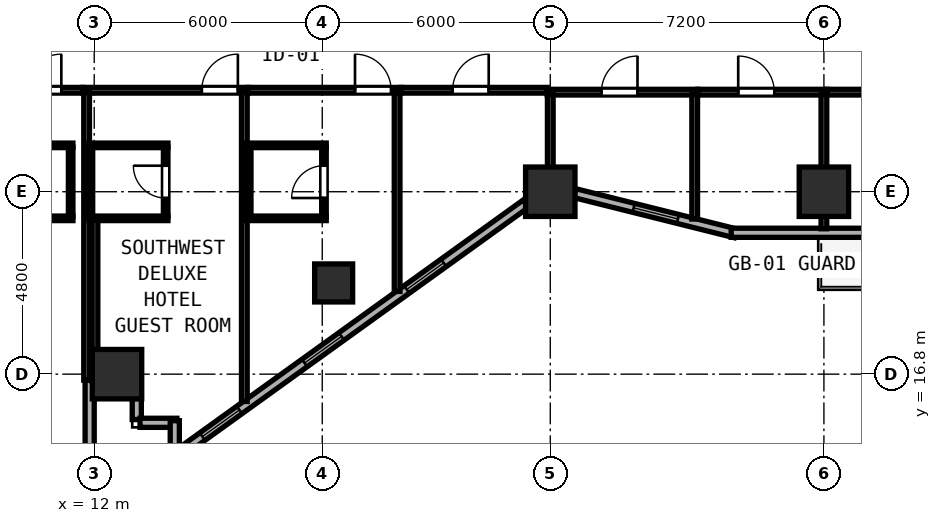
"""IFC4 building model, lengths in metres.
Left out: names, types, materials, properties, quantities, classifications, styles, units other than length and angle.
Written with IfcOpenShell. Run it as: python <this file> out.ifc"""

import sys

from ifc_helpers import new_model, si_unit, direction, frame, frame_2d, origin, origin_2d, place, context, subcontext, project, spatial, rectangle, hollow_rectangle, extrude, element, fill, save


model = new_model("IFC4")
c1 = context("Model", 3, precision=1e-05, world=origin(), true_north=direction((0.0, 1.0)))
c2 = subcontext(c1, "Body", "Model", "MODEL_VIEW")
j1 = project(units=[si_unit("LENGTHUNIT", "METRE"), si_unit("PLANEANGLEUNIT", "RADIAN")], contexts=[c1])
p1 = place(None, origin())
s1 = spatial("IfcSite", under=j1, at=p1, CompositionType="ELEMENT")
p2 = place(p1, origin())
s2 = spatial("IfcBuilding", under=s1, at=p2, CompositionType="ELEMENT")
p3 = place(p2, frame((0.0, 0.0, 39.2)))
s3 = spatial("IfcBuildingStorey", under=s2, at=p3, CompositionType="ELEMENT", Elevation=39.2)
for number, where, z_axis, x_axis in (
    (1, (24.0, 21.6, 0.0), (0.0, 0.0, 1.0), (1.0, 0.0, 0.0)),
    (2, (31.2, 21.6, 0.0), (0.0, 0.0, 1.0), (1.0, 0.0, 0.0)),
    (3, (12.6, 16.8, 0.0), (0.0, 0.0, 1.0), (1.0, 0.0, 0.0)),
):
    element("IfcColumn", number, at=place(p3, frame(where, z_axis=z_axis, x_axis=x_axis)), inside=s3, PredefinedType="COLUMN", context=c2, shape_type="SweptSolid", body=[
        extrude(hollow_rectangle(XDim=1.3, YDim=1.3, WallThickness=0.048, at=origin_2d()), origin(), (0.0, 0.0, 1.0), 3.8),
    ])
p4 = place(p3, frame((18.3, 19.2, 0.0), z_axis=(0.0, 0.0, 1.0), x_axis=(1.0, 0.0, 0.0)))
e4 = element("IfcColumn", 4, at=p4, inside=s3, PredefinedType="COLUMN", context=c2, shape_type="SweptSolid", body=[
    extrude(hollow_rectangle(XDim=1.0, YDim=1.0, WallThickness=0.038, at=origin_2d()), origin(), (0.0, 0.0, 1.0), 3.8),
])
p5 = place(p3, frame((11.88, 14.394, 0.0), z_axis=(0.0, 0.0, 1.0), x_axis=(0.0, 1.0, 0.0)))
e5 = element("IfcWall", 5, at=p5, inside=s3, PredefinedType="SOLIDWALL", context=c2, shape_type="SweptSolid", body=[
    extrude(rectangle(XDim=2.246, YDim=0.24, at=frame_2d((1.123, 0.0))), origin(), (0.0, 0.0, 1.0), 3.54),
])
p6 = place(p3, frame((13.12, 16.158, 0.0), z_axis=(0.0, 0.0, 1.0), x_axis=(0.0, -1.0, 0.0)))
e6 = element("IfcWall", 6, at=p6, inside=s3, PredefinedType="SOLIDWALL", context=c2, shape_type="SweptSolid", body=[
    extrude(rectangle(XDim=0.553, YDim=0.24, at=frame_2d((0.276, 0.0))), origin(), (0.0, 0.0, 1.0), 3.54),
])
p7 = place(p3, frame((13.205, 15.52, 0.0), z_axis=(0.0, 0.0, 1.0), x_axis=(1.0, 0.0, 0.0)))
e7 = element("IfcWall", 7, at=p7, inside=s3, PredefinedType="SOLIDWALL", context=c2, shape_type="SweptSolid", body=[
    extrude(rectangle(XDim=0.97, YDim=0.24, at=frame_2d((0.485, 0.0))), origin(), (0.0, 0.0, 1.0), 3.54),
])
p8 = place(p3, frame((14.12, 15.575, 0.0), z_axis=(0.0, 0.0, 1.0), x_axis=(0.0, -1.0, 0.0)))
e8 = element("IfcWall", 8, at=p8, inside=s3, PredefinedType="SOLIDWALL", context=c2, shape_type="SweptSolid", body=[
    extrude(rectangle(XDim=0.996, YDim=0.24, at=frame_2d((0.498, 0.0))), origin(), (0.0, 0.0, 1.0), 3.54),
])
p9 = place(p3, frame((14.075, 14.602, 0.0), z_axis=(0.0, 0.0, 1.0), x_axis=(0.811535555989, 0.584303038984, 0.0)))
e9 = element("IfcWall", 9, at=p9, inside=s3, PredefinedType="SOLIDWALL", context=c2, shape_type="SweptSolid", body=[
    extrude(rectangle(XDim=11.438, YDim=0.24, at=frame_2d((5.719, 0.0))), origin(), (0.0, 0.0, 1.0), 3.037),
])
p10 = place(p9, frame((0.95, 0.0, 0.85)))
e10 = element("IfcOpeningElement", 10, at=p10, cuts=e9, PredefinedType="OPENING", context=c2, shape_type="SweptSolid", body=[
    extrude(rectangle(XDim=1.2, YDim=1.85, at=frame_2d((0.6, 0.925))), frame((0.0, 0.13, 0.0), z_axis=(0.0, -1.0, 0.0), x_axis=(1.0, 0.0, 0.0)), (0.0, 0.0, 1.0), 0.26),
])
p11 = place(p9, frame((7.574, 0.0, 0.85)))
e11 = element("IfcOpeningElement", 11, at=p11, cuts=e9, PredefinedType="OPENING", context=c2, shape_type="SweptSolid", body=[
    extrude(rectangle(XDim=1.2, YDim=1.85, at=frame_2d((0.6, 0.925))), frame((0.0, 0.13, 0.0), z_axis=(0.0, -1.0, 0.0), x_axis=(1.0, 0.0, 0.0)), (0.0, 0.0, 1.0), 0.26),
])
p12 = place(p9, frame((4.262, 0.0, 0.85)))
e12 = element("IfcOpeningElement", 12, at=p12, cuts=e9, PredefinedType="OPENING", context=c2, shape_type="SweptSolid", body=[
    extrude(rectangle(XDim=1.2, YDim=1.85, at=frame_2d((0.6, 0.925))), frame((0.0, 0.13, 0.0), z_axis=(0.0, -1.0, 0.0), x_axis=(1.0, 0.0, 0.0)), (0.0, 0.0, 1.0), 0.26),
])
p13 = place(p3, frame((24.642, 21.563, 0.0), z_axis=(0.0, 0.0, 1.0), x_axis=(0.970135906278, -0.242561998982, 0.0)))
e13 = element("IfcWall", 13, at=p13, inside=s3, PredefinedType="SOLIDWALL", context=c2, shape_type="SweptSolid", body=[
    extrude(rectangle(XDim=4.356, YDim=0.24, at=frame_2d((2.178, 0.0))), origin(), (0.0, 0.0, 1.0), 3.037),
])
p14 = place(p13, frame((1.6, 0.0, 0.85)))
e14 = element("IfcOpeningElement", 14, at=p14, cuts=e13, PredefinedType="OPENING", context=c2, shape_type="SweptSolid", body=[
    extrude(rectangle(XDim=1.2, YDim=1.85, at=frame_2d((0.6, 0.925))), frame((0.0, 0.13, 0.0), z_axis=(0.0, -1.0, 0.0), x_axis=(1.0, 0.0, 0.0)), (0.0, 0.0, 1.0), 0.26),
])
p15 = place(p3, frame((28.76, 20.52, 0.0), z_axis=(0.0, 0.0, 1.0), x_axis=(1.0, 0.0, 0.0)))
e15 = element("IfcWall", 15, at=p15, inside=s3, PredefinedType="SOLIDWALL", context=c2, shape_type="SweptSolid", body=[
    extrude(rectangle(XDim=19.281, YDim=0.24, at=frame_2d((9.64, 0.0))), origin(), (0.0, 0.0, 1.0), 3.54),
])
p16 = place(p15, frame((4.84, 0.0, 0.0), z_axis=(0.0, 0.0, 1.0), x_axis=(-1.0, 0.0, 0.0)))
e16 = element("IfcOpeningElement", 16, at=p16, cuts=e15, PredefinedType="OPENING", context=c2, shape_type="SweptSolid", body=[
    extrude(rectangle(XDim=1.2, YDim=2.15, at=frame_2d((0.6, 1.075))), frame((0.0, 0.13, 0.0), z_axis=(0.0, -1.0, 0.0), x_axis=(1.0, 0.0, 0.0)), (0.0, 0.0, 1.0), 0.26),
])
p17 = place(p15, frame((15.64, 0.0, 0.0), z_axis=(0.0, 0.0, 1.0), x_axis=(-1.0, 0.0, 0.0)))
e17 = element("IfcOpeningElement", 17, at=p17, cuts=e15, PredefinedType="OPENING", context=c2, shape_type="SweptSolid", body=[
    extrude(rectangle(XDim=1.2, YDim=2.15, at=frame_2d((0.6, 1.075))), frame((0.0, 0.13, 0.0), z_axis=(0.0, -1.0, 0.0), x_axis=(1.0, 0.0, 0.0)), (0.0, 0.0, 1.0), 0.26),
])
p18 = place(p3, frame((23.92, 24.22, 0.0), z_axis=(0.0, 0.0, 1.0), x_axis=(1.0, 0.0, 0.0)))
e18 = element("IfcWall", 18, at=p18, inside=s3, PredefinedType="PARTITIONING", context=c2, shape_type="SweptSolid", body=[
    extrude(rectangle(XDim=3.96, YDim=0.15, at=frame_2d((1.98, 0.0))), origin(), (0.0, 0.0, 1.0), 3.54),
])
p19 = place(p18, frame((2.375, 0.0, 0.0), z_axis=(0.0, 0.0, 1.0), x_axis=(-1.0, 0.0, 0.0)))
e19 = element("IfcOpeningElement", 19, at=p19, cuts=e18, PredefinedType="OPENING", context=c2, shape_type="SweptSolid", body=[
    extrude(rectangle(XDim=0.95, YDim=2.12, at=frame_2d((0.475, 1.06))), frame((0.0, 0.085, 0.0), z_axis=(0.0, -1.0, 0.0), x_axis=(1.0, 0.0, 0.0)), (0.0, 0.0, 1.0), 0.17),
])
p20 = place(p3, frame((24.0, 21.819, 0.0), z_axis=(0.0, 0.0, 1.0), x_axis=(0.0, 1.0, 0.0)))
e20 = element("IfcWall", 20, at=p20, inside=s3, PredefinedType="PARTITIONING", context=c2, shape_type="SweptSolid", body=[
    extrude(rectangle(XDim=2.341, YDim=0.15, at=frame_2d((1.171, 0.0))), origin(), (0.0, 0.0, 1.0), 3.037),
])
p21 = place(p3, frame((27.8, 20.882, 0.0), z_axis=(0.0, 0.0, 1.0), x_axis=(0.0, 1.0, 0.0)))
e21 = element("IfcWall", 21, at=p21, inside=s3, PredefinedType="PARTITIONING", context=c2, shape_type="SweptSolid", body=[
    extrude(rectangle(XDim=3.278, YDim=0.15, at=frame_2d((1.639, 0.0))), origin(), (0.0, 0.0, 1.0), 3.54),
])
p22 = place(p3, frame((27.882, 24.22, 0.0), z_axis=(0.0, 0.0, 1.0), x_axis=(1.0, 0.0, 0.0)))
e22 = element("IfcWall", 22, at=p22, inside=s3, PredefinedType="PARTITIONING", context=c2, shape_type="SweptSolid", body=[
    extrude(rectangle(XDim=3.398, YDim=0.15, at=frame_2d((1.699, 0.0))), origin(), (0.0, 0.0, 1.0), 3.54),
])
p23 = place(p22, frame((2.013, 0.0, 0.0), z_axis=(0.0, 0.0, 1.0), x_axis=(-1.0, 0.0, 0.0)))
e23 = element("IfcOpeningElement", 23, at=p23, cuts=e22, PredefinedType="OPENING", context=c2, shape_type="SweptSolid", body=[
    extrude(rectangle(XDim=0.95, YDim=2.12, at=frame_2d((0.475, 1.06))), frame((0.0, 0.085, 0.0), z_axis=(0.0, -1.0, 0.0), x_axis=(1.0, 0.0, 0.0)), (0.0, 0.0, 1.0), 0.17),
])
p24 = place(p3, frame((31.2, 20.625, 0.0), z_axis=(0.0, 0.0, 1.0), x_axis=(0.0, 1.0, 0.0)))
e24 = element("IfcWall", 24, at=p24, inside=s3, PredefinedType="PARTITIONING", context=c2, shape_type="SweptSolid", body=[
    extrude(rectangle(XDim=3.535, YDim=0.15, at=frame_2d((1.768, 0.0))), origin(), (0.0, 0.0, 1.0), 2.925),
])
p25 = place(p3, frame((31.282, 24.22, 0.0), z_axis=(0.0, 0.0, 1.0), x_axis=(1.0, 0.0, 0.0)))
e25 = element("IfcWall", 25, at=p25, inside=s3, PredefinedType="PARTITIONING", context=c2, shape_type="SweptSolid", body=[
    extrude(rectangle(XDim=4.598, YDim=0.15, at=frame_2d((2.299, 0.0))), origin(), (0.0, 0.0, 1.0), 3.54),
])
p26 = place(p25, frame((2.613, 0.0, 0.0), z_axis=(0.0, 0.0, 1.0), x_axis=(-1.0, 0.0, 0.0)))
e26 = element("IfcOpeningElement", 26, at=p26, cuts=e25, PredefinedType="OPENING", context=c2, shape_type="SweptSolid", body=[
    extrude(rectangle(XDim=0.95, YDim=2.12, at=frame_2d((0.475, 1.06))), frame((0.0, 0.085, 0.0), z_axis=(0.0, -1.0, 0.0), x_axis=(1.0, 0.0, 0.0)), (0.0, 0.0, 1.0), 0.17),
])
p27 = place(p3, frame((11.7, 24.27, 0.0), z_axis=(0.0, 0.0, 1.0), x_axis=(1.0, 0.0, 0.0)))
e27 = element("IfcWall", 27, at=p27, inside=s3, PredefinedType="PARTITIONING", context=c2, shape_type="SweptSolid", body=[
    extrude(rectangle(XDim=4.35, YDim=0.15, at=frame_2d((2.175, 0.0))), origin(), (0.0, 0.0, 1.0), 3.54),
])
p28 = place(p27, frame((4.08, 0.0, 0.0), z_axis=(0.0, 0.0, 1.0), x_axis=(-1.0, 0.0, 0.0)))
e28 = element("IfcOpeningElement", 28, at=p28, cuts=e27, PredefinedType="OPENING", context=c2, shape_type="SweptSolid", body=[
    extrude(rectangle(XDim=0.95, YDim=2.15, at=frame_2d((0.475, 1.075))), frame((0.0, 0.085, 0.0), z_axis=(0.0, -1.0, 0.0), x_axis=(1.0, 0.0, 0.0)), (0.0, 0.0, 1.0), 0.17),
])
p29 = place(p3, frame((11.8, 16.642, 0.0), z_axis=(0.0, 0.0, 1.0), x_axis=(0.0, 1.0, 0.0)))
e29 = element("IfcWall", 29, at=p29, inside=s3, PredefinedType="PARTITIONING", context=c2, shape_type="SweptSolid", body=[
    extrude(rectangle(XDim=7.568, YDim=0.15, at=frame_2d((3.784, 0.0))), origin(), (0.0, 0.0, 1.0), 3.54),
])
p30 = place(p3, frame((15.95, 16.081, 0.0), z_axis=(0.0, 0.0, 1.0), x_axis=(0.0, 1.0, 0.0)))
e30 = element("IfcWall", 30, at=p30, inside=s3, PredefinedType="PARTITIONING", context=c2, shape_type="SweptSolid", body=[
    extrude(rectangle(XDim=8.129, YDim=0.15, at=frame_2d((4.064, 0.0))), origin(), (0.0, 0.0, 1.0), 3.54),
])
for number, where, z_axis, x_axis in (
    (31, (11.86, 22.82, 0.0), (0.0, 0.0, 1.0), (1.0, 0.0, 0.0)),
    (32, (11.86, 20.9, 0.0), (0.0, 0.0, 1.0), (1.0, 0.0, 0.0)),
):
    element("IfcWall", number, at=place(p3, frame(where, z_axis=z_axis, x_axis=x_axis)), inside=s3, PredefinedType="PARTITIONING", context=c2, shape_type="SweptSolid", body=[
        extrude(rectangle(XDim=2.08, YDim=0.12, at=frame_2d((1.04, 0.0))), origin(), (0.0, 0.0, 1.0), 3.54),
    ])
p31 = place(p3, frame((11.9, 20.945, 0.0), z_axis=(0.0, 0.0, 1.0), x_axis=(0.0, 1.0, 0.0)))
e33 = element("IfcWall", 33, at=p31, inside=s3, PredefinedType="PARTITIONING", context=c2, shape_type="SweptSolid", body=[
    extrude(rectangle(XDim=1.83, YDim=0.12, at=frame_2d((0.915, 0.0))), origin(), (0.0, 0.0, 1.0), 3.54),
])
p32 = place(p3, frame((13.88, 20.945, 0.0), z_axis=(0.0, 0.0, 1.0), x_axis=(0.0, 1.0, 0.0)))
e34 = element("IfcWall", 34, at=p32, inside=s3, PredefinedType="PARTITIONING", context=c2, shape_type="SweptSolid", body=[
    extrude(rectangle(XDim=1.83, YDim=0.12, at=frame_2d((0.915, 0.0))), origin(), (0.0, 0.0, 1.0), 3.54),
])
p33 = place(p32, frame((0.49, 0.0, 0.0)))
e35 = element("IfcOpeningElement", 35, at=p33, cuts=e34, PredefinedType="OPENING", context=c2, shape_type="SweptSolid", body=[
    extrude(rectangle(XDim=0.85, YDim=2.1, at=frame_2d((0.425, 1.05))), frame((0.0, 0.07, 0.0), z_axis=(0.0, -1.0, 0.0), x_axis=(1.0, 0.0, 0.0)), (0.0, 0.0, 1.0), 0.14),
])
p34 = place(p3, frame((16.052, 24.27, 0.0), z_axis=(0.0, 0.0, 1.0), x_axis=(1.0, 0.0, 0.0)))
e36 = element("IfcWall", 36, at=p34, inside=s3, PredefinedType="PARTITIONING", context=c2, shape_type="SweptSolid", body=[
    extrude(rectangle(XDim=4.018, YDim=0.15, at=frame_2d((2.009, 0.0))), origin(), (0.0, 0.0, 1.0), 3.54),
])
p35 = place(p34, frame((3.76, 0.0, 0.0), z_axis=(0.0, 0.0, 1.0), x_axis=(-1.0, 0.0, 0.0)))
e37 = element("IfcOpeningElement", 37, at=p35, cuts=e36, PredefinedType="OPENING", context=c2, shape_type="SweptSolid", body=[
    extrude(rectangle(XDim=0.95, YDim=2.15, at=frame_2d((0.475, 1.075))), frame((0.0, 0.085, 0.0), z_axis=(0.0, -1.0, 0.0), x_axis=(1.0, 0.0, 0.0)), (0.0, 0.0, 1.0), 0.17),
])
p36 = place(p3, frame((19.97, 18.976, 0.0), z_axis=(0.0, 0.0, 1.0), x_axis=(0.0, 1.0, 0.0)))
e38 = element("IfcWall", 38, at=p36, inside=s3, PredefinedType="PARTITIONING", context=c2, shape_type="SweptSolid", body=[
    extrude(rectangle(XDim=5.234, YDim=0.15, at=frame_2d((2.617, 0.0))), origin(), (0.0, 0.0, 1.0), 3.54),
])
for number, where, z_axis, x_axis in (
    (39, (16.01, 22.82, 0.0), (0.0, 0.0, 1.0), (1.0, 0.0, 0.0)),
    (40, (16.01, 20.9, 0.0), (0.0, 0.0, 1.0), (1.0, 0.0, 0.0)),
):
    element("IfcWall", number, at=place(p3, frame(where, z_axis=z_axis, x_axis=x_axis)), inside=s3, PredefinedType="PARTITIONING", context=c2, shape_type="SweptSolid", body=[
        extrude(rectangle(XDim=2.095, YDim=0.12, at=frame_2d((1.047, 0.0))), origin(), (0.0, 0.0, 1.0), 3.54),
    ])
p37 = place(p3, frame((16.065, 20.945, 0.0), z_axis=(0.0, 0.0, 1.0), x_axis=(0.0, 1.0, 0.0)))
e41 = element("IfcWall", 41, at=p37, inside=s3, PredefinedType="PARTITIONING", context=c2, shape_type="SweptSolid", body=[
    extrude(rectangle(XDim=1.83, YDim=0.12, at=frame_2d((0.915, 0.0))), origin(), (0.0, 0.0, 1.0), 3.54),
])
p38 = place(p3, frame((18.045, 20.945, 0.0), z_axis=(0.0, 0.0, 1.0), x_axis=(0.0, 1.0, 0.0)))
e42 = element("IfcWall", 42, at=p38, inside=s3, PredefinedType="PARTITIONING", context=c2, shape_type="SweptSolid", body=[
    extrude(rectangle(XDim=1.83, YDim=0.12, at=frame_2d((0.915, 0.0))), origin(), (0.0, 0.0, 1.0), 3.54),
])
p39 = place(p38, frame((0.49, 0.0, 0.0)))
e43 = element("IfcOpeningElement", 43, at=p39, cuts=e42, PredefinedType="OPENING", context=c2, shape_type="SweptSolid", body=[
    extrude(rectangle(XDim=0.85, YDim=2.1, at=frame_2d((0.425, 1.05))), frame((0.0, 0.07, 0.0), z_axis=(0.0, -1.0, 0.0), x_axis=(1.0, 0.0, 0.0)), (0.0, 0.0, 1.0), 0.14),
])
p40 = place(p3, frame((20.072, 24.27, 0.0), z_axis=(0.0, 0.0, 1.0), x_axis=(1.0, 0.0, 0.0)))
e44 = element("IfcWall", 44, at=p40, inside=s3, PredefinedType="PARTITIONING", context=c2, shape_type="SweptSolid", body=[
    extrude(rectangle(XDim=3.846, YDim=0.15, at=frame_2d((1.923, 0.0))), origin(), (0.0, 0.0, 1.0), 3.54),
])
p41 = place(p40, frame((2.308, 0.0, 0.0), z_axis=(0.0, 0.0, 1.0), x_axis=(-1.0, 0.0, 0.0)))
e45 = element("IfcOpeningElement", 45, at=p41, cuts=e44, PredefinedType="OPENING", context=c2, shape_type="SweptSolid", body=[
    extrude(rectangle(XDim=0.95, YDim=2.12, at=frame_2d((0.475, 1.06))), frame((0.0, 0.085, 0.0), z_axis=(0.0, -1.0, 0.0), x_axis=(1.0, 0.0, 0.0)), (0.0, 0.0, 1.0), 0.17),
])
p42 = place(p3, frame((9.402, 24.27, 0.0), z_axis=(0.0, 0.0, 1.0), x_axis=(1.0, 0.0, 0.0)))
e46 = element("IfcWall", 46, at=p42, inside=s3, PredefinedType="PARTITIONING", context=c2, shape_type="SweptSolid", body=[
    extrude(rectangle(XDim=2.296, YDim=0.15, at=frame_2d((1.148, 0.0))), origin(), (0.0, 0.0, 1.0), 3.54),
])
p43 = place(p42, frame((1.733, 0.0, 0.0), z_axis=(0.0, 0.0, 1.0), x_axis=(-1.0, 0.0, 0.0)))
e47 = element("IfcOpeningElement", 47, at=p43, cuts=e46, PredefinedType="OPENING", context=c2, shape_type="SweptSolid", body=[
    extrude(rectangle(XDim=0.95, YDim=2.15, at=frame_2d((0.475, 1.075))), frame((0.0, 0.085, 0.0), z_axis=(0.0, -1.0, 0.0), x_axis=(1.0, 0.0, 0.0)), (0.0, 0.0, 1.0), 0.17),
])
p44 = place(p3, frame((12.02, 16.612, 0.0), z_axis=(0.0, 0.0, 1.0), x_axis=(0.0, 1.0, 0.0)))
e48 = element("IfcWall", 48, at=p44, inside=s3, PredefinedType="PARTITIONING", context=c2, shape_type="SweptSolid", body=[
    extrude(rectangle(XDim=4.243, YDim=0.15, at=frame_2d((2.122, 0.0))), origin(), (0.0, 0.0, 1.0), 3.54),
])
p45 = place(p3, frame((9.36, 22.82, 0.0), z_axis=(0.0, 0.0, 1.0), x_axis=(1.0, 0.0, 0.0)))
e49 = element("IfcWall", 49, at=p45, inside=s3, PredefinedType="PARTITIONING", context=c2, shape_type="SweptSolid", body=[
    extrude(rectangle(XDim=2.08, YDim=0.12, at=frame_2d((1.04, 0.0))), origin(), (0.0, 0.0, 1.0), 3.54),
])
p46 = place(p45, frame((1.455, 0.0, 0.0), z_axis=(0.0, 0.0, 1.0), x_axis=(-1.0, 0.0, 0.0)))
e50 = element("IfcOpeningElement", 50, at=p46, cuts=e49, PredefinedType="OPENING", context=c2, shape_type="SweptSolid", body=[
    extrude(rectangle(XDim=0.85, YDim=2.1, at=frame_2d((0.425, 1.05))), frame((0.0, 0.07, 0.0), z_axis=(0.0, -1.0, 0.0), x_axis=(1.0, 0.0, 0.0)), (0.0, 0.0, 1.0), 0.14),
])
p47 = place(p3, frame((9.36, 20.9, 0.0), z_axis=(0.0, 0.0, 1.0), x_axis=(1.0, 0.0, 0.0)))
e51 = element("IfcWall", 51, at=p47, inside=s3, PredefinedType="PARTITIONING", context=c2, shape_type="SweptSolid", body=[
    extrude(rectangle(XDim=2.08, YDim=0.12, at=frame_2d((1.04, 0.0))), origin(), (0.0, 0.0, 1.0), 3.54),
])
p48 = place(p3, frame((11.38, 20.945, 0.0), z_axis=(0.0, 0.0, 1.0), x_axis=(0.0, 1.0, 0.0)))
e52 = element("IfcWall", 52, at=p48, inside=s3, PredefinedType="PARTITIONING", context=c2, shape_type="SweptSolid", body=[
    extrude(rectangle(XDim=1.83, YDim=0.12, at=frame_2d((0.915, 0.0))), origin(), (0.0, 0.0, 1.0), 3.54),
])
p49 = place(p10, origin())
e53 = element("IfcWindow", 53, at=p49, inside=s3, PartitioningType="SINGLE_PANEL", PredefinedType="WINDOW", context=c2, shape_type="SweptSolid", body=[
    extrude(rectangle(XDim=1.2, YDim=1.85, at=frame_2d((0.6, 0.925))), frame((0.0, 0.03, 0.0), z_axis=(0.0, -1.0, 0.0), x_axis=(1.0, 0.0, 0.0)), (0.0, 0.0, 1.0), 0.06),
])
fill(e10, e53)
p50 = place(p11, origin())
e54 = element("IfcWindow", 54, at=p50, inside=s3, PartitioningType="SINGLE_PANEL", PredefinedType="WINDOW", context=c2, shape_type="SweptSolid", body=[
    extrude(rectangle(XDim=1.2, YDim=1.85, at=frame_2d((0.6, 0.925))), frame((0.0, 0.03, 0.0), z_axis=(0.0, -1.0, 0.0), x_axis=(1.0, 0.0, 0.0)), (0.0, 0.0, 1.0), 0.06),
])
fill(e11, e54)
p51 = place(p14, origin())
e55 = element("IfcWindow", 55, at=p51, inside=s3, PartitioningType="SINGLE_PANEL", PredefinedType="WINDOW", context=c2, shape_type="SweptSolid", body=[
    extrude(rectangle(XDim=1.2, YDim=1.85, at=frame_2d((0.6, 0.925))), frame((0.0, 0.03, 0.0), z_axis=(0.0, -1.0, 0.0), x_axis=(1.0, 0.0, 0.0)), (0.0, 0.0, 1.0), 0.06),
])
fill(e14, e55)
p52 = place(p19, origin())
e56 = element("IfcDoor", 56, at=p52, inside=s3, OperationType="SINGLE_SWING_LEFT", PredefinedType="DOOR", context=c2, shape_type="SweptSolid", body=[
    extrude(rectangle(XDim=0.95, YDim=2.12, at=frame_2d((0.475, 1.06))), frame((0.0, 0.025, 0.0), z_axis=(0.0, -1.0, 0.0), x_axis=(1.0, 0.0, 0.0)), (0.0, 0.0, 1.0), 0.05),
])
fill(e19, e56)
p53 = place(p23, origin())
e57 = element("IfcDoor", 57, at=p53, inside=s3, OperationType="SINGLE_SWING_RIGHT", PredefinedType="DOOR", context=c2, shape_type="SweptSolid", body=[
    extrude(rectangle(XDim=0.95, YDim=2.12, at=frame_2d((0.475, 1.06))), frame((0.0, 0.025, 0.0), z_axis=(0.0, -1.0, 0.0), x_axis=(1.0, 0.0, 0.0)), (0.0, 0.0, 1.0), 0.05),
])
fill(e23, e57)
p54 = place(p28, origin())
e58 = element("IfcDoor", 58, at=p54, inside=s3, OperationType="SINGLE_SWING_LEFT", PredefinedType="DOOR", context=c2, shape_type="SweptSolid", body=[
    extrude(rectangle(XDim=0.95, YDim=2.15, at=frame_2d((0.475, 1.075))), frame((0.0, 0.025, 0.0), z_axis=(0.0, -1.0, 0.0), x_axis=(1.0, 0.0, 0.0)), (0.0, 0.0, 1.0), 0.05),
])
fill(e28, e58)
p55 = place(p33, origin())
e59 = element("IfcDoor", 59, at=p55, inside=s3, OperationType="SINGLE_SWING_RIGHT", PredefinedType="DOOR", context=c2, shape_type="SweptSolid", body=[
    extrude(rectangle(XDim=0.85, YDim=2.1, at=frame_2d((0.425, 1.05))), frame((0.0, 0.025, 0.0), z_axis=(0.0, -1.0, 0.0), x_axis=(1.0, 0.0, 0.0)), (0.0, 0.0, 1.0), 0.05),
])
fill(e35, e59)
p56 = place(p35, origin())
e60 = element("IfcDoor", 60, at=p56, inside=s3, OperationType="SINGLE_SWING_RIGHT", PredefinedType="DOOR", context=c2, shape_type="SweptSolid", body=[
    extrude(rectangle(XDim=0.95, YDim=2.15, at=frame_2d((0.475, 1.075))), frame((0.0, 0.025, 0.0), z_axis=(0.0, -1.0, 0.0), x_axis=(1.0, 0.0, 0.0)), (0.0, 0.0, 1.0), 0.05),
])
fill(e37, e60)
p57 = place(p39, origin())
e61 = element("IfcDoor", 61, at=p57, inside=s3, OperationType="SINGLE_SWING_LEFT", PredefinedType="DOOR", context=c2, shape_type="SweptSolid", body=[
    extrude(rectangle(XDim=0.85, YDim=2.1, at=frame_2d((0.425, 1.05))), frame((0.0, 0.025, 0.0), z_axis=(0.0, -1.0, 0.0), x_axis=(1.0, 0.0, 0.0)), (0.0, 0.0, 1.0), 0.05),
])
fill(e43, e61)
p58 = place(p41, origin())
e62 = element("IfcDoor", 62, at=p58, inside=s3, OperationType="SINGLE_SWING_LEFT", PredefinedType="DOOR", context=c2, shape_type="SweptSolid", body=[
    extrude(rectangle(XDim=0.95, YDim=2.12, at=frame_2d((0.475, 1.06))), frame((0.0, 0.025, 0.0), z_axis=(0.0, -1.0, 0.0), x_axis=(1.0, 0.0, 0.0)), (0.0, 0.0, 1.0), 0.05),
])
fill(e45, e62)
p59 = place(p43, origin())
e63 = element("IfcDoor", 63, at=p59, inside=s3, OperationType="SINGLE_SWING_LEFT", PredefinedType="DOOR", context=c2, shape_type="SweptSolid", body=[
    extrude(rectangle(XDim=0.95, YDim=2.15, at=frame_2d((0.475, 1.075))), frame((0.0, 0.025, 0.0), z_axis=(0.0, -1.0, 0.0), x_axis=(1.0, 0.0, 0.0)), (0.0, 0.0, 1.0), 0.05),
])
fill(e47, e63)
p60 = place(p12, origin())
e64 = element("IfcWindow", 64, at=p60, inside=s3, PartitioningType="SINGLE_PANEL", PredefinedType="WINDOW", context=c2, shape_type="SweptSolid", body=[
    extrude(rectangle(XDim=1.2, YDim=1.85, at=frame_2d((0.6, 0.925))), frame((0.0, 0.03, 0.0), z_axis=(0.0, -1.0, 0.0), x_axis=(1.0, 0.0, 0.0)), (0.0, 0.0, 1.0), 0.06),
])
fill(e12, e64)
save(model, sys.argv[1])
